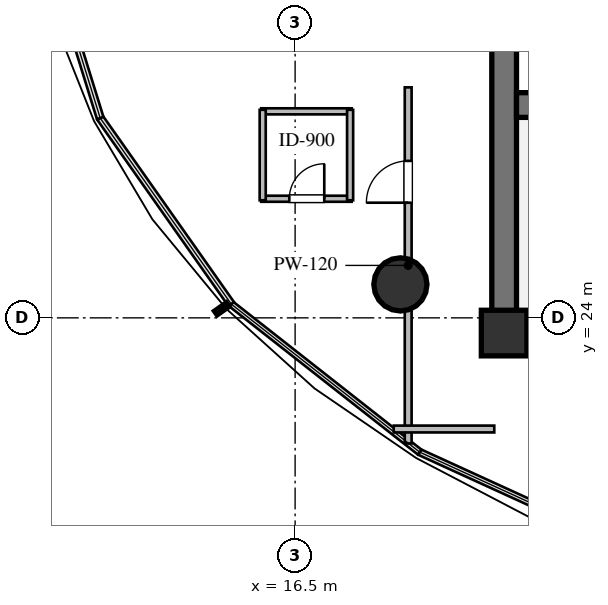
"""IFC4 building model, lengths in metres.
Left out: names, types, materials, properties, quantities, classifications, styles, units other than length and angle.
Written with IfcOpenShell. Run it as: python <this file> out.ifc"""

import sys

from ifc_helpers import new_model, si_unit, direction, frame, frame_2d, origin, origin_2d, place, context, subcontext, project, spatial, rectangle, circle, extrude, element, fill, save


model = new_model("IFC4")
c1 = context("Model", 3, precision=1e-05, world=origin(), true_north=direction((0.0, 1.0)))
c2 = subcontext(c1, "Body", "Model", "MODEL_VIEW")
j1 = project(units=[si_unit("LENGTHUNIT", "METRE"), si_unit("PLANEANGLEUNIT", "RADIAN")], contexts=[c1])
p1 = place(None, origin())
s1 = spatial("IfcSite", under=j1, at=p1, CompositionType="ELEMENT")
p2 = place(p1, origin())
s2 = spatial("IfcBuilding", under=s1, at=p2, CompositionType="ELEMENT")
p3 = place(p2, frame((0.0, 0.0, 56.4)))
s3 = spatial("IfcBuildingStorey", under=s2, at=p3, CompositionType="ELEMENT", Elevation=56.4)
p4 = place(p3, frame((21.675, 23.6, 0.0), z_axis=(0.0, 0.0, 1.0), x_axis=(1.0, 0.0, 0.0)))
e1 = element("IfcWall", 1, at=p4, inside=s3, PredefinedType="SHEAR", context=c2, shape_type="SweptSolid", body=[
    extrude(rectangle(XDim=22.65, YDim=0.65, at=frame_2d((11.325, 0.0))), origin(), (0.0, 0.0, 1.0), 3.36),
])
p5 = place(p3, frame((22.0, 23.925, 0.0), z_axis=(0.0, 0.0, 1.0), x_axis=(0.0, 1.0, 0.0)))
e2 = element("IfcWall", 2, at=p5, inside=s3, PredefinedType="SHEAR", context=c2, shape_type="SweptSolid", body=[
    extrude(rectangle(XDim=12.15, YDim=0.65, at=frame_2d((6.075, 0.0))), origin(), (0.0, 0.0, 1.0), 3.36),
])
p6 = place(p3, frame((22.325, 29.6, 0.0), z_axis=(0.0, 0.0, 1.0), x_axis=(1.0, 0.0, 0.0)))
e3 = element("IfcWall", 3, at=p6, inside=s3, PredefinedType="SHEAR", context=c2, shape_type="SweptSolid", body=[
    extrude(rectangle(XDim=21.35, YDim=0.65, at=frame_2d((10.675, 0.0))), origin(), (0.0, 0.0, 1.0), 3.36),
])
p7 = place(p6, frame((12.125, 0.0, 0.0)))
e4 = element("IfcOpeningElement", 4, at=p7, cuts=e3, PredefinedType="OPENING", context=c2, shape_type="SweptSolid", body=[
    extrude(rectangle(XDim=1.15, YDim=2.1, at=frame_2d((0.575, 1.05))), frame((0.0, 0.335, 0.0), z_axis=(0.0, -1.0, 0.0), x_axis=(1.0, 0.0, 0.0)), (0.0, 0.0, 1.0), 0.67),
])
p8 = place(p3, frame((22.0, 23.6, 0.0), z_axis=(0.0, 0.0, 1.0), x_axis=(1.0, 0.0, 0.0)))
e5 = element("IfcColumn", 5, at=p8, inside=s3, PredefinedType="COLUMN", context=c2, shape_type="SweptSolid", body=[
    extrude(rectangle(XDim=1.2, YDim=1.2, at=origin_2d()), origin(), (0.0, 0.0, 1.0), 3.6),
])
p9 = place(p3, frame((19.27, 24.88, 0.0), z_axis=(0.0, 0.0, 1.0), x_axis=(1.0, 0.0, 0.0)))
e6 = element("IfcColumn", 6, at=p9, inside=s3, PredefinedType="COLUMN", context=c2, shape_type="SweptSolid", body=[
    extrude(circle(Radius=0.7, at=origin_2d()), origin(), (0.0, 0.0, 1.0), 3.6),
])
p10 = place(p3, frame((15.607, 27.134, 0.0), z_axis=(0.0, 0.0, 1.0), x_axis=(1.0, 0.0, 0.0)))
e7 = element("IfcWall", 7, at=p10, inside=s3, PredefinedType="PLUMBINGWALL", context=c2, shape_type="SweptSolid", body=[
    extrude(rectangle(XDim=2.38, YDim=0.16, at=frame_2d((1.19, 0.0))), origin(), (0.0, 0.0, 1.0), 3.36),
])
p11 = place(p10, frame((0.74, 0.0, 0.0)))
e8 = element("IfcOpeningElement", 8, at=p11, cuts=e7, PredefinedType="OPENING", context=c2, shape_type="SweptSolid", body=[
    extrude(rectangle(XDim=0.92, YDim=2.1, at=frame_2d((0.46, 1.05))), frame((0.0, 0.09, 0.0), z_axis=(0.0, -1.0, 0.0), x_axis=(1.0, 0.0, 0.0)), (0.0, 0.0, 1.0), 0.18),
])
for number, where, z_axis, x_axis in (
    (9, (15.607, 29.434, 0.0), (0.0, 0.0, 1.0), (1.0, 0.0, 0.0)),
    (10, (15.647, 27.094, 0.0), (0.0, 0.0, 1.0), (0.0, 1.0, 0.0)),
):
    element("IfcWall", number, at=place(p3, frame(where, z_axis=z_axis, x_axis=x_axis)), inside=s3, PredefinedType="PLUMBINGWALL", context=c2, shape_type="SweptSolid", body=[
        extrude(rectangle(XDim=2.38, YDim=0.16, at=frame_2d((1.19, 0.0))), origin(), (0.0, 0.0, 1.0), 3.36),
    ])
p12 = place(p3, frame((17.947, 27.094, 0.0), z_axis=(0.0, 0.0, 1.0), x_axis=(0.0, 1.0, 0.0)))
e11 = element("IfcWall", 11, at=p12, inside=s3, PredefinedType="PLUMBINGWALL", context=c2, shape_type="SweptSolid", body=[
    extrude(rectangle(XDim=2.38, YDim=0.16, at=frame_2d((1.19, 0.0))), origin(), (0.0, 0.0, 1.0), 2.738),
])
p13 = place(p3, frame((19.475, 20.695, 0.0), z_axis=(0.0, 0.0, 1.0), x_axis=(0.0, 1.0, 0.0)))
e12 = element("IfcWall", 12, at=p13, inside=s3, PredefinedType="PARTITIONING", context=c2, shape_type="SweptSolid", body=[
    extrude(rectangle(XDim=9.37, YDim=0.18, at=frame_2d((4.685, 0.0))), origin(), (0.0, 0.0, 1.0), 2.738),
])
p14 = place(p13, frame((6.335, 0.0, 0.0)))
e13 = element("IfcOpeningElement", 13, at=p14, cuts=e12, PredefinedType="OPENING", context=c2, shape_type="SweptSolid", body=[
    extrude(rectangle(XDim=1.1, YDim=2.1, at=frame_2d((0.55, 1.05))), frame((0.0, 0.1, 0.0), z_axis=(0.0, -1.0, 0.0), x_axis=(1.0, 0.0, 0.0)), (0.0, 0.0, 1.0), 0.2),
])
p15 = place(p3, frame((21.74, 21.075, 0.0), z_axis=(0.0, 0.0, 1.0), x_axis=(-1.0, 0.0, 0.0)))
e14 = element("IfcWall", 14, at=p15, inside=s3, PredefinedType="PARTITIONING", context=c2, shape_type="SweptSolid", body=[
    extrude(rectangle(XDim=2.645, YDim=0.18, at=frame_2d((1.323, 0.0))), origin(), (0.0, 0.0, 1.0), 3.36),
])
p16 = place(p11, origin())
e15 = element("IfcDoor", 15, at=p16, inside=s3, OperationType="SINGLE_SWING_RIGHT", PredefinedType="DOOR", context=c2, shape_type="SweptSolid", body=[
    extrude(rectangle(XDim=0.92, YDim=2.1, at=frame_2d((0.46, 1.05))), frame((0.0, 0.025, 0.0), z_axis=(0.0, -1.0, 0.0), x_axis=(1.0, 0.0, 0.0)), (0.0, 0.0, 1.0), 0.05),
])
fill(e8, e15)
p17 = place(p14, origin())
e16 = element("IfcDoor", 16, at=p17, inside=s3, OperationType="SINGLE_SWING_LEFT", PredefinedType="DOOR", context=c2, shape_type="SweptSolid", body=[
    extrude(rectangle(XDim=1.1, YDim=2.1, at=frame_2d((0.55, 1.05))), frame((0.0, 0.025, 0.0), z_axis=(0.0, -1.0, 0.0), x_axis=(1.0, 0.0, 0.0)), (0.0, 0.0, 1.0), 0.05),
])
fill(e13, e16)
save(model, sys.argv[1])
